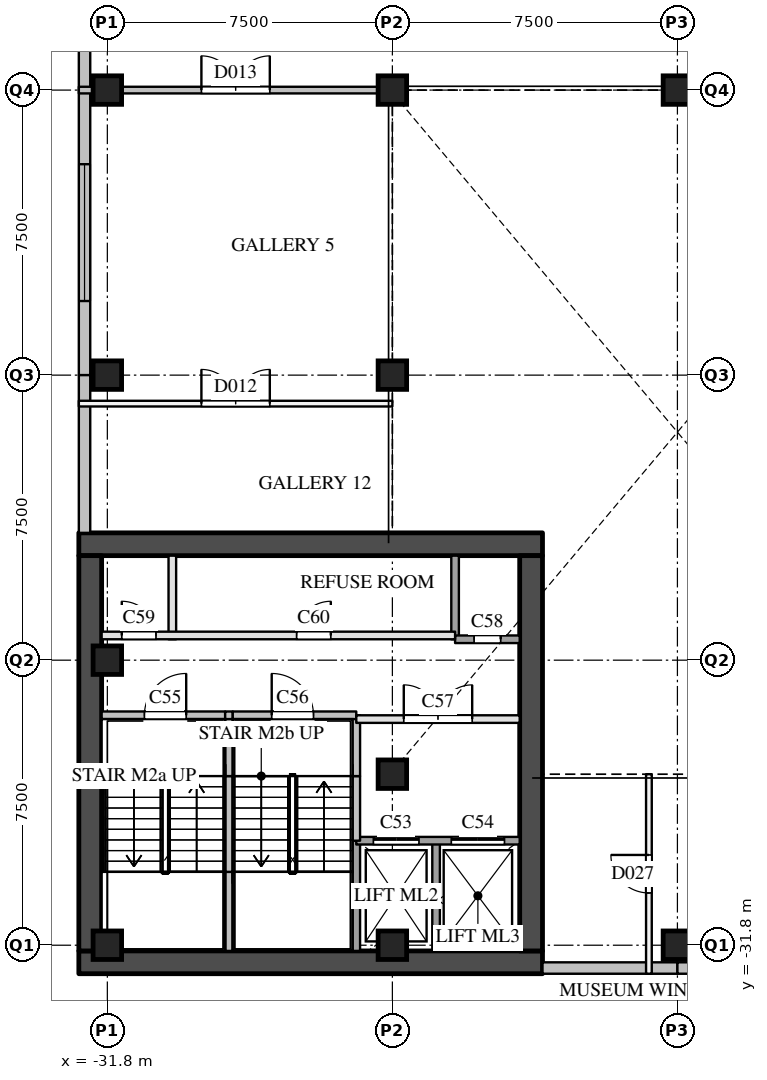
"""IFC4 building model, lengths in metres.
Left out: names, types, materials, properties, quantities, classifications, styles, units other than length and angle.
Written with IfcOpenShell. Run it as: python <this file> out.ifc"""

import sys

from ifc_helpers import new_model, si_unit, direction, frame, frame_2d, origin, origin_2d, place, context, subcontext, project, spatial, rectangle, extrude, element, fill, save


model = new_model("IFC4")
c1 = context("Model", 3, precision=1e-05, world=origin(), true_north=direction((0.0, 1.0)))
c2 = subcontext(c1, "Body", "Model", "MODEL_VIEW")
j1 = project(units=[si_unit("LENGTHUNIT", "METRE"), si_unit("PLANEANGLEUNIT", "RADIAN")], contexts=[c1])
p1 = place(None, origin())
s1 = spatial("IfcSite", under=j1, at=p1, CompositionType="ELEMENT")
p2 = place(p1, origin())
s2 = spatial("IfcBuilding", under=s1, at=p2, CompositionType="ELEMENT")
p3 = place(p2, frame((0.0, 0.0, 14.0)))
s3 = spatial("IfcBuildingStorey", under=s2, at=p3, CompositionType="ELEMENT", Elevation=14.0)
for number, where, z_axis, x_axis in (
    (1, (-31.8, -31.8, 0.0), (0.0, 0.0, 1.0), (1.0, 0.0, 0.0)),
    (2, (-31.8, -24.3, 0.0), (0.0, 0.0, 1.0), (1.0, 0.0, 0.0)),
    (3, (-31.8, -16.8, 0.0), (0.0, 0.0, 1.0), (1.0, 0.0, 0.0)),
    (4, (-31.8, -9.3, 0.0), (0.0, 0.0, 1.0), (1.0, 0.0, 0.0)),
    (5, (-24.3, -31.8, 0.0), (0.0, 0.0, 1.0), (1.0, 0.0, 0.0)),
    (6, (-24.3, -16.8, 0.0), (0.0, 0.0, 1.0), (1.0, 0.0, 0.0)),
    (7, (-24.3, -9.3, 0.0), (0.0, 0.0, 1.0), (1.0, 0.0, 0.0)),
    (8, (-16.8, -31.8, 0.0), (0.0, 0.0, 1.0), (1.0, 0.0, 0.0)),
    (9, (-16.8, -9.3, 0.0), (0.0, 0.0, 1.0), (1.0, 0.0, 0.0)),
    (10, (-24.3, -27.3, 0.0), (0.0, 0.0, 1.0), (1.0, 0.0, 0.0)),
):
    element("IfcColumn", number, at=place(p3, frame(where, z_axis=z_axis, x_axis=x_axis)), inside=s3, PredefinedType="COLUMN", context=c2, shape_type="SweptSolid", body=[
        extrude(rectangle(XDim=0.75, YDim=0.75, at=origin_2d()), origin(), (0.0, 0.0, 1.0), 7.0),
    ])
p4 = place(p3, frame((-20.35, -32.4, 0.0), z_axis=(0.0, 0.0, 1.0), x_axis=(1.0, 0.0, 0.0)))
e11 = element("IfcWall", 11, at=p4, inside=s3, PredefinedType="SOLIDWALL", context=c2, shape_type="SweptSolid", body=[
    extrude(rectangle(XDim=3.55, YDim=0.3, at=frame_2d((1.775, 0.0))), origin(), (0.0, 0.0, 1.0), 6.59),
])
p5 = place(p3, frame((-16.8, -32.4, 0.0), z_axis=(0.0, 0.0, 1.0), x_axis=(1.0, 0.0, 0.0)))
e12 = element("IfcWall", 12, at=p5, inside=s3, PredefinedType="SOLIDWALL", context=c2, shape_type="SweptSolid", body=[
    extrude(rectangle(XDim=7.5, YDim=0.3, at=frame_2d((3.75, 0.0))), origin(), (0.0, 0.0, 1.0), 6.59),
])
p6 = place(p5, frame((1.95, 0.0, 0.9)))
e13 = element("IfcOpeningElement", 13, at=p6, cuts=e12, PredefinedType="OPENING", context=c2, shape_type="SweptSolid", body=[
    extrude(rectangle(XDim=3.6, YDim=3.0, at=frame_2d((1.8, 1.5))), frame((0.0, 0.16, 0.0), z_axis=(0.0, -1.0, 0.0), x_axis=(1.0, 0.0, 0.0)), (0.0, 0.0, 1.0), 0.32),
])
p7 = place(p3, frame((-32.4, -1.8, 0.0), z_axis=(0.0, 0.0, 1.0), x_axis=(0.0, -1.0, 0.0)))
e14 = element("IfcWall", 14, at=p7, inside=s3, PredefinedType="SOLIDWALL", context=c2, shape_type="SweptSolid", body=[
    extrude(rectangle(XDim=7.5, YDim=0.3, at=frame_2d((3.75, 0.0))), origin(), (0.0, 0.0, 1.0), 6.59),
])
p8 = place(p7, frame((1.95, 0.0, 0.9)))
e15 = element("IfcOpeningElement", 15, at=p8, cuts=e14, PredefinedType="OPENING", context=c2, shape_type="SweptSolid", body=[
    extrude(rectangle(XDim=3.6, YDim=3.0, at=frame_2d((1.8, 1.5))), frame((0.0, 0.16, 0.0), z_axis=(0.0, -1.0, 0.0), x_axis=(1.0, 0.0, 0.0)), (0.0, 0.0, 1.0), 0.32),
])
p9 = place(p3, frame((-32.4, -9.3, 0.0), z_axis=(0.0, 0.0, 1.0), x_axis=(0.0, -1.0, 0.0)))
e16 = element("IfcWall", 16, at=p9, inside=s3, PredefinedType="SOLIDWALL", context=c2, shape_type="SweptSolid", body=[
    extrude(rectangle(XDim=7.5, YDim=0.3, at=frame_2d((3.75, 0.0))), origin(), (0.0, 0.0, 1.0), 6.59),
])
p10 = place(p9, frame((1.95, 0.0, 0.9)))
e17 = element("IfcOpeningElement", 17, at=p10, cuts=e16, PredefinedType="OPENING", context=c2, shape_type="SweptSolid", body=[
    extrude(rectangle(XDim=3.6, YDim=3.0, at=frame_2d((1.8, 1.5))), frame((0.0, 0.16, 0.0), z_axis=(0.0, -1.0, 0.0), x_axis=(1.0, 0.0, 0.0)), (0.0, 0.0, 1.0), 0.32),
])
p11 = place(p3, frame((-32.4, -16.8, 0.0), z_axis=(0.0, 0.0, 1.0), x_axis=(0.0, -1.0, 0.0)))
e18 = element("IfcWall", 18, at=p11, inside=s3, PredefinedType="SOLIDWALL", context=c2, shape_type="SweptSolid", body=[
    extrude(rectangle(XDim=4.15, YDim=0.3, at=frame_2d((2.075, 0.0))), origin(), (0.0, 0.0, 1.0), 6.59),
])
for number, where, z_axis, x_axis in (
    (19, (-32.55, -32.25, 0.0), (0.0, 0.0, 1.0), (1.0, 0.0, 0.0)),
    (20, (-32.55, -21.25, 0.0), (0.0, 0.0, 1.0), (1.0, 0.0, 0.0)),
):
    element("IfcWall", number, at=place(p3, frame(where, z_axis=z_axis, x_axis=x_axis)), inside=s3, PredefinedType="SHEAR", context=c2, shape_type="SweptSolid", body=[
        extrude(rectangle(XDim=12.2, YDim=0.6, at=frame_2d((6.1, 0.0))), origin(), (0.0, 0.0, 1.0), 6.59),
    ])
for number, where, z_axis, x_axis in (
    (21, (-32.25, -31.95, 0.0), (0.0, 0.0, 1.0), (0.0, 1.0, 0.0)),
    (22, (-20.65, -31.95, 0.0), (0.0, 0.0, 1.0), (0.0, 1.0, 0.0)),
):
    element("IfcWall", number, at=place(p3, frame(where, z_axis=z_axis, x_axis=x_axis)), inside=s3, PredefinedType="SHEAR", context=c2, shape_type="SweptSolid", body=[
        extrude(rectangle(XDim=10.4, YDim=0.6, at=frame_2d((5.2, 0.0))), origin(), (0.0, 0.0, 1.0), 6.59),
    ])
p12 = place(p3, frame((-30.09, -23.75, 0.0), z_axis=(0.0, 0.0, 1.0), x_axis=(0.0, 1.0, 0.0)))
e23 = element("IfcWall", 23, at=p12, inside=s3, PredefinedType="PARTITIONING", context=c2, shape_type="SweptSolid", body=[
    extrude(rectangle(XDim=2.2, YDim=0.2, at=frame_2d((1.1, 0.0))), origin(), (0.0, 0.0, 1.0), 6.59),
])
p13 = place(p3, frame((-28.6, -31.95, 0.0), z_axis=(0.0, 0.0, 1.0), x_axis=(0.0, 1.0, 0.0)))
e24 = element("IfcWall", 24, at=p13, inside=s3, PredefinedType="SOLIDWALL", context=c2, shape_type="SweptSolid", body=[
    extrude(rectangle(XDim=2.08, YDim=0.2, at=frame_2d((1.04, 0.0))), origin(), (0.0, 0.0, 1.0), 6.59),
])
p14 = place(p3, frame((-28.6, -29.87, 0.0), z_axis=(0.0, 0.0, 1.0), x_axis=(0.0, 1.0, 0.0)))
e25 = element("IfcWall", 25, at=p14, inside=s3, PredefinedType="SOLIDWALL", context=c2, shape_type="SweptSolid", body=[
    extrude(rectangle(XDim=2.52, YDim=0.2, at=frame_2d((1.26, 0.0))), origin(), (0.0, 0.0, 1.0), 6.59),
])
p15 = place(p3, frame((-28.6, -27.35, 0.0), z_axis=(0.0, 0.0, 1.0), x_axis=(0.0, 1.0, 0.0)))
e26 = element("IfcWall", 26, at=p15, inside=s3, PredefinedType="SOLIDWALL", context=c2, shape_type="SweptSolid", body=[
    extrude(rectangle(XDim=1.6, YDim=0.2, at=frame_2d((0.8, 0.0))), origin(), (0.0, 0.0, 1.0), 6.59),
])
p16 = place(p3, frame((-25.25, -31.95, 0.0), z_axis=(0.0, 0.0, 1.0), x_axis=(0.0, 1.0, 0.0)))
e27 = element("IfcWall", 27, at=p16, inside=s3, PredefinedType="SOLIDWALL", context=c2, shape_type="SweptSolid", body=[
    extrude(rectangle(XDim=2.9, YDim=0.2, at=frame_2d((1.45, 0.0))), origin(), (0.0, 0.0, 1.0), 6.59),
])
p17 = place(p3, frame((-25.25, -29.05, 0.0), z_axis=(0.0, 0.0, 1.0), x_axis=(0.0, 1.0, 0.0)))
e28 = element("IfcWall", 28, at=p17, inside=s3, PredefinedType="SOLIDWALL", context=c2, shape_type="SweptSolid", body=[
    extrude(rectangle(XDim=1.7, YDim=0.2, at=frame_2d((0.85, 0.0))), origin(), (0.0, 0.0, 1.0), 6.59),
])
p18 = place(p3, frame((-25.25, -27.35, 0.0), z_axis=(0.0, 0.0, 1.0), x_axis=(0.0, 1.0, 0.0)))
e29 = element("IfcWall", 29, at=p18, inside=s3, PredefinedType="SOLIDWALL", context=c2, shape_type="SweptSolid", body=[
    extrude(rectangle(XDim=1.6, YDim=0.2, at=frame_2d((0.8, 0.0))), origin(), (0.0, 0.0, 1.0), 6.59),
])
p19 = place(p3, frame((-23.15, -31.95, 0.0), z_axis=(0.0, 0.0, 1.0), x_axis=(0.0, 1.0, 0.0)))
e30 = element("IfcWall", 30, at=p19, inside=s3, PredefinedType="SOLIDWALL", context=c2, shape_type="SweptSolid", body=[
    extrude(rectangle(XDim=2.9, YDim=0.2, at=frame_2d((1.45, 0.0))), origin(), (0.0, 0.0, 1.0), 6.59),
])
p20 = place(p3, frame((-22.65, -23.75, 0.0), z_axis=(0.0, 0.0, 1.0), x_axis=(0.0, 1.0, 0.0)))
e31 = element("IfcWall", 31, at=p20, inside=s3, PredefinedType="SOLIDWALL", context=c2, shape_type="SweptSolid", body=[
    extrude(rectangle(XDim=2.2, YDim=0.2, at=frame_2d((1.1, 0.0))), origin(), (0.0, 0.0, 1.0), 6.59),
])
p21 = place(p3, frame((-25.25, -29.05, 0.0), z_axis=(0.0, 0.0, 1.0), x_axis=(1.0, 0.0, 0.0)))
e32 = element("IfcWall", 32, at=p21, inside=s3, PredefinedType="SOLIDWALL", context=c2, shape_type="SweptSolid", body=[
    extrude(rectangle(XDim=4.3, YDim=0.2, at=frame_2d((2.15, 0.0))), origin(), (0.0, 0.0, 1.0), 6.59),
])
p22 = place(p21, frame((0.45, 0.0, 0.0)))
e33 = element("IfcOpeningElement", 33, at=p22, cuts=e32, PredefinedType="OPENING", context=c2, shape_type="SweptSolid", body=[
    extrude(rectangle(XDim=1.2, YDim=2.1, at=frame_2d((0.6, 1.05))), frame((0.0, 0.11, 0.0), z_axis=(0.0, -1.0, 0.0), x_axis=(1.0, 0.0, 0.0)), (0.0, 0.0, 1.0), 0.22),
])
p23 = place(p21, frame((2.5, 0.0, 0.0)))
e34 = element("IfcOpeningElement", 34, at=p23, cuts=e32, PredefinedType="OPENING", context=c2, shape_type="SweptSolid", body=[
    extrude(rectangle(XDim=1.4, YDim=2.1, at=frame_2d((0.7, 1.05))), frame((0.0, 0.11, 0.0), z_axis=(0.0, -1.0, 0.0), x_axis=(1.0, 0.0, 0.0)), (0.0, 0.0, 1.0), 0.22),
])
p24 = place(p3, frame((-25.25, -25.85, 0.0), z_axis=(0.0, 0.0, 1.0), x_axis=(1.0, 0.0, 0.0)))
e35 = element("IfcWall", 35, at=p24, inside=s3, PredefinedType="PARTITIONING", context=c2, shape_type="SweptSolid", body=[
    extrude(rectangle(XDim=4.3, YDim=0.2, at=frame_2d((2.15, 0.0))), origin(), (0.0, 0.0, 1.0), 6.59),
])
p25 = place(p24, frame((1.25, 0.0, 0.0)))
e36 = element("IfcOpeningElement", 36, at=p25, cuts=e35, PredefinedType="OPENING", context=c2, shape_type="SweptSolid", body=[
    extrude(rectangle(XDim=1.8, YDim=2.1, at=frame_2d((0.9, 1.05))), frame((0.0, 0.11, 0.0), z_axis=(0.0, -1.0, 0.0), x_axis=(1.0, 0.0, 0.0)), (0.0, 0.0, 1.0), 0.22),
])
p26 = place(p3, frame((-31.95, -25.75, 0.0), z_axis=(0.0, 0.0, 1.0), x_axis=(1.0, 0.0, 0.0)))
e37 = element("IfcWall", 37, at=p26, inside=s3, PredefinedType="SOLIDWALL", context=c2, shape_type="SweptSolid", body=[
    extrude(rectangle(XDim=3.25, YDim=0.2, at=frame_2d((1.625, 0.0))), origin(), (0.0, 0.0, 1.0), 6.59),
])
p27 = place(p26, frame((1.125, 0.0, 0.0)))
e38 = element("IfcOpeningElement", 38, at=p27, cuts=e37, PredefinedType="OPENING", context=c2, shape_type="SweptSolid", body=[
    extrude(rectangle(XDim=1.1, YDim=2.1, at=frame_2d((0.55, 1.05))), frame((0.0, 0.11, 0.0), z_axis=(0.0, -1.0, 0.0), x_axis=(1.0, 0.0, 0.0)), (0.0, 0.0, 1.0), 0.22),
])
p28 = place(p3, frame((-28.7, -25.75, 0.0), z_axis=(0.0, 0.0, 1.0), x_axis=(1.0, 0.0, 0.0)))
e39 = element("IfcWall", 39, at=p28, inside=s3, PredefinedType="SOLIDWALL", context=c2, shape_type="SweptSolid", body=[
    extrude(rectangle(XDim=0.2, YDim=0.2, at=frame_2d((0.1, 0.0))), origin(), (0.0, 0.0, 1.0), 6.59),
])
p29 = place(p3, frame((-28.5, -25.75, 0.0), z_axis=(0.0, 0.0, 1.0), x_axis=(1.0, 0.0, 0.0)))
e40 = element("IfcWall", 40, at=p29, inside=s3, PredefinedType="SOLIDWALL", context=c2, shape_type="SweptSolid", body=[
    extrude(rectangle(XDim=3.25, YDim=0.2, at=frame_2d((1.625, 0.0))), origin(), (0.0, 0.0, 1.0), 6.59),
])
p30 = place(p29, frame((1.025, 0.0, 0.0)))
e41 = element("IfcOpeningElement", 41, at=p30, cuts=e40, PredefinedType="OPENING", context=c2, shape_type="SweptSolid", body=[
    extrude(rectangle(XDim=1.1, YDim=2.1, at=frame_2d((0.55, 1.05))), frame((0.0, 0.11, 0.0), z_axis=(0.0, -1.0, 0.0), x_axis=(1.0, 0.0, 0.0)), (0.0, 0.0, 1.0), 0.22),
])
p31 = place(p3, frame((-31.95, -23.65, 0.0), z_axis=(0.0, 0.0, 1.0), x_axis=(1.0, 0.0, 0.0)))
e42 = element("IfcWall", 42, at=p31, inside=s3, PredefinedType="PARTITIONING", context=c2, shape_type="SweptSolid", body=[
    extrude(rectangle(XDim=9.3, YDim=0.2, at=frame_2d((4.65, 0.0))), origin(), (0.0, 0.0, 1.0), 6.59),
])
p32 = place(p31, frame((0.53, 0.0, 0.0)))
e43 = element("IfcOpeningElement", 43, at=p32, cuts=e42, PredefinedType="OPENING", context=c2, shape_type="SweptSolid", body=[
    extrude(rectangle(XDim=0.9, YDim=2.1, at=frame_2d((0.45, 1.05))), frame((0.0, 0.11, 0.0), z_axis=(0.0, -1.0, 0.0), x_axis=(1.0, 0.0, 0.0)), (0.0, 0.0, 1.0), 0.22),
])
p33 = place(p31, frame((5.13, 0.0, 0.0)))
e44 = element("IfcOpeningElement", 44, at=p33, cuts=e42, PredefinedType="OPENING", context=c2, shape_type="SweptSolid", body=[
    extrude(rectangle(XDim=0.9, YDim=2.1, at=frame_2d((0.45, 1.05))), frame((0.0, 0.11, 0.0), z_axis=(0.0, -1.0, 0.0), x_axis=(1.0, 0.0, 0.0)), (0.0, 0.0, 1.0), 0.22),
])
p34 = place(p3, frame((-22.65, -23.75, 0.0), z_axis=(0.0, 0.0, 1.0), x_axis=(1.0, 0.0, 0.0)))
e45 = element("IfcWall", 45, at=p34, inside=s3, PredefinedType="SOLIDWALL", context=c2, shape_type="SweptSolid", body=[
    extrude(rectangle(XDim=1.7, YDim=0.2, at=frame_2d((0.85, 0.0))), origin(), (0.0, 0.0, 1.0), 6.59),
])
p35 = place(p34, frame((0.5, 0.0, 0.0)))
e46 = element("IfcOpeningElement", 46, at=p35, cuts=e45, PredefinedType="OPENING", context=c2, shape_type="SweptSolid", body=[
    extrude(rectangle(XDim=0.7, YDim=2.1, at=frame_2d((0.35, 1.05))), frame((0.0, 0.11, 0.0), z_axis=(0.0, -1.0, 0.0), x_axis=(1.0, 0.0, 0.0)), (0.0, 0.0, 1.0), 0.22),
])
p36 = place(p3, frame((-32.55, -9.3, 0.0), z_axis=(0.0, 0.0, 1.0), x_axis=(1.0, 0.0, 0.0)))
e47 = element("IfcWall", 47, at=p36, inside=s3, PredefinedType="PARTITIONING", context=c2, shape_type="SweptSolid", body=[
    extrude(rectangle(XDim=8.25, YDim=0.175, at=frame_2d((4.125, 0.0))), origin(), (0.0, 0.0, 1.0), 5.79),
])
p37 = place(p36, frame((3.225, 0.0, 0.0)))
e48 = element("IfcOpeningElement", 48, at=p37, cuts=e47, PredefinedType="OPENING", context=c2, shape_type="SweptSolid", body=[
    extrude(rectangle(XDim=1.8, YDim=2.1, at=frame_2d((0.9, 1.05))), frame((0.0, 0.097, 0.0), z_axis=(0.0, -1.0, 0.0), x_axis=(1.0, 0.0, 0.0)), (0.0, 0.0, 1.0), 0.195),
])
p38 = place(p3, frame((-32.55, -17.55, 0.0), z_axis=(0.0, 0.0, 1.0), x_axis=(1.0, 0.0, 0.0)))
e49 = element("IfcWall", 49, at=p38, inside=s3, PredefinedType="PARTITIONING", context=c2, shape_type="SweptSolid", body=[
    extrude(rectangle(XDim=8.25, YDim=0.15, at=frame_2d((4.125, 0.0))), origin(), (0.0, 0.0, 1.0), 5.79),
])
p39 = place(p38, frame((3.225, 0.0, 0.0)))
e50 = element("IfcOpeningElement", 50, at=p39, cuts=e49, PredefinedType="OPENING", context=c2, shape_type="SweptSolid", body=[
    extrude(rectangle(XDim=1.8, YDim=2.1, at=frame_2d((0.9, 1.05))), frame((0.0, 0.085, 0.0), z_axis=(0.0, -1.0, 0.0), x_axis=(1.0, 0.0, 0.0)), (0.0, 0.0, 1.0), 0.17),
])
p40 = place(p3, frame((-17.55, -32.55, 0.0), z_axis=(0.0, 0.0, 1.0), x_axis=(0.0, 1.0, 0.0)))
e51 = element("IfcWall", 51, at=p40, inside=s3, PredefinedType="PARTITIONING", context=c2, shape_type="SweptSolid", body=[
    extrude(rectangle(XDim=5.25, YDim=0.15, at=frame_2d((2.625, 0.0))), origin(), (0.0, 0.0, 1.0), 6.59),
])
p41 = place(p40, frame((2.125, 0.0, 0.0)))
e52 = element("IfcOpeningElement", 52, at=p41, cuts=e51, PredefinedType="OPENING", context=c2, shape_type="SweptSolid", body=[
    extrude(rectangle(XDim=1.0, YDim=2.1, at=frame_2d((0.5, 1.05))), frame((0.0, 0.085, 0.0), z_axis=(0.0, -1.0, 0.0), x_axis=(1.0, 0.0, 0.0)), (0.0, 0.0, 1.0), 0.17),
])
p42 = place(p10, origin())
e53 = element("IfcWindow", 53, at=p42, inside=s3, PartitioningType="SINGLE_PANEL", PredefinedType="WINDOW", context=c2, shape_type="SweptSolid", body=[
    extrude(rectangle(XDim=3.6, YDim=3.0, at=frame_2d((1.8, 1.5))), frame((0.0, 0.03, 0.0), z_axis=(0.0, -1.0, 0.0), x_axis=(1.0, 0.0, 0.0)), (0.0, 0.0, 1.0), 0.06),
])
fill(e17, e53)
p43 = place(p22, origin())
e54 = element("IfcDoor", 54, at=p43, inside=s3, OperationType="SLIDING_TO_LEFT", PredefinedType="DOOR", context=c2, shape_type="SweptSolid", body=[
    extrude(rectangle(XDim=1.2, YDim=2.1, at=frame_2d((0.6, 1.05))), frame((0.0, 0.025, 0.0), z_axis=(0.0, -1.0, 0.0), x_axis=(1.0, 0.0, 0.0)), (0.0, 0.0, 1.0), 0.05),
])
fill(e33, e54)
p44 = place(p23, origin())
e55 = element("IfcDoor", 55, at=p44, inside=s3, OperationType="SLIDING_TO_LEFT", PredefinedType="DOOR", context=c2, shape_type="SweptSolid", body=[
    extrude(rectangle(XDim=1.4, YDim=2.1, at=frame_2d((0.7, 1.05))), frame((0.0, 0.025, 0.0), z_axis=(0.0, -1.0, 0.0), x_axis=(1.0, 0.0, 0.0)), (0.0, 0.0, 1.0), 0.05),
])
fill(e34, e55)
p45 = place(p27, origin())
e56 = element("IfcDoor", 56, at=p45, inside=s3, OperationType="SINGLE_SWING_RIGHT", PredefinedType="DOOR", context=c2, shape_type="SweptSolid", body=[
    extrude(rectangle(XDim=1.1, YDim=2.1, at=frame_2d((0.55, 1.05))), frame((0.0, 0.025, 0.0), z_axis=(0.0, -1.0, 0.0), x_axis=(1.0, 0.0, 0.0)), (0.0, 0.0, 1.0), 0.05),
])
fill(e38, e56)
p46 = place(p30, origin())
e57 = element("IfcDoor", 57, at=p46, inside=s3, OperationType="SINGLE_SWING_LEFT", PredefinedType="DOOR", context=c2, shape_type="SweptSolid", body=[
    extrude(rectangle(XDim=1.1, YDim=2.1, at=frame_2d((0.55, 1.05))), frame((0.0, 0.025, 0.0), z_axis=(0.0, -1.0, 0.0), x_axis=(1.0, 0.0, 0.0)), (0.0, 0.0, 1.0), 0.05),
])
fill(e41, e57)
p47 = place(p25, origin())
e58 = element("IfcDoor", 58, at=p47, inside=s3, OperationType="DOUBLE_DOOR_SINGLE_SWING", PredefinedType="DOOR", context=c2, shape_type="SweptSolid", body=[
    extrude(rectangle(XDim=1.8, YDim=2.1, at=frame_2d((0.9, 1.05))), frame((0.0, 0.025, 0.0), z_axis=(0.0, -1.0, 0.0), x_axis=(1.0, 0.0, 0.0)), (0.0, 0.0, 1.0), 0.05),
])
fill(e36, e58)
p48 = place(p35, origin())
e59 = element("IfcDoor", 59, at=p48, inside=s3, OperationType="SINGLE_SWING_RIGHT", PredefinedType="DOOR", context=c2, shape_type="SweptSolid", body=[
    extrude(rectangle(XDim=0.7, YDim=2.1, at=frame_2d((0.35, 1.05))), frame((0.0, 0.025, 0.0), z_axis=(0.0, -1.0, 0.0), x_axis=(1.0, 0.0, 0.0)), (0.0, 0.0, 1.0), 0.05),
])
fill(e46, e59)
p49 = place(p32, origin())
e60 = element("IfcDoor", 60, at=p49, inside=s3, OperationType="SINGLE_SWING_LEFT", PredefinedType="DOOR", context=c2, shape_type="SweptSolid", body=[
    extrude(rectangle(XDim=0.9, YDim=2.1, at=frame_2d((0.45, 1.05))), frame((0.0, 0.025, 0.0), z_axis=(0.0, -1.0, 0.0), x_axis=(1.0, 0.0, 0.0)), (0.0, 0.0, 1.0), 0.05),
])
fill(e43, e60)
p50 = place(p33, origin())
e61 = element("IfcDoor", 61, at=p50, inside=s3, OperationType="SINGLE_SWING_RIGHT", PredefinedType="DOOR", context=c2, shape_type="SweptSolid", body=[
    extrude(rectangle(XDim=0.9, YDim=2.1, at=frame_2d((0.45, 1.05))), frame((0.0, 0.025, 0.0), z_axis=(0.0, -1.0, 0.0), x_axis=(1.0, 0.0, 0.0)), (0.0, 0.0, 1.0), 0.05),
])
fill(e44, e61)
p51 = place(p39, origin())
e62 = element("IfcDoor", 62, at=p51, inside=s3, OperationType="DOUBLE_DOOR_SINGLE_SWING", PredefinedType="DOOR", context=c2, shape_type="SweptSolid", body=[
    extrude(rectangle(XDim=1.8, YDim=2.1, at=frame_2d((0.9, 1.05))), frame((0.0, 0.025, 0.0), z_axis=(0.0, -1.0, 0.0), x_axis=(1.0, 0.0, 0.0)), (0.0, 0.0, 1.0), 0.05),
])
fill(e50, e62)
p52 = place(p37, origin())
e63 = element("IfcDoor", 63, at=p52, inside=s3, OperationType="DOUBLE_DOOR_SINGLE_SWING", PredefinedType="DOOR", context=c2, shape_type="SweptSolid", body=[
    extrude(rectangle(XDim=1.8, YDim=2.1, at=frame_2d((0.9, 1.05))), frame((0.0, 0.025, 0.0), z_axis=(0.0, -1.0, 0.0), x_axis=(1.0, 0.0, 0.0)), (0.0, 0.0, 1.0), 0.05),
])
fill(e48, e63)
p53 = place(p41, origin())
e64 = element("IfcDoor", 64, at=p53, inside=s3, OperationType="SINGLE_SWING_RIGHT", PredefinedType="DOOR", context=c2, shape_type="SweptSolid", body=[
    extrude(rectangle(XDim=1.0, YDim=2.1, at=frame_2d((0.5, 1.05))), frame((0.0, 0.025, 0.0), z_axis=(0.0, -1.0, 0.0), x_axis=(1.0, 0.0, 0.0)), (0.0, 0.0, 1.0), 0.05),
])
fill(e52, e64)
save(model, sys.argv[1])
